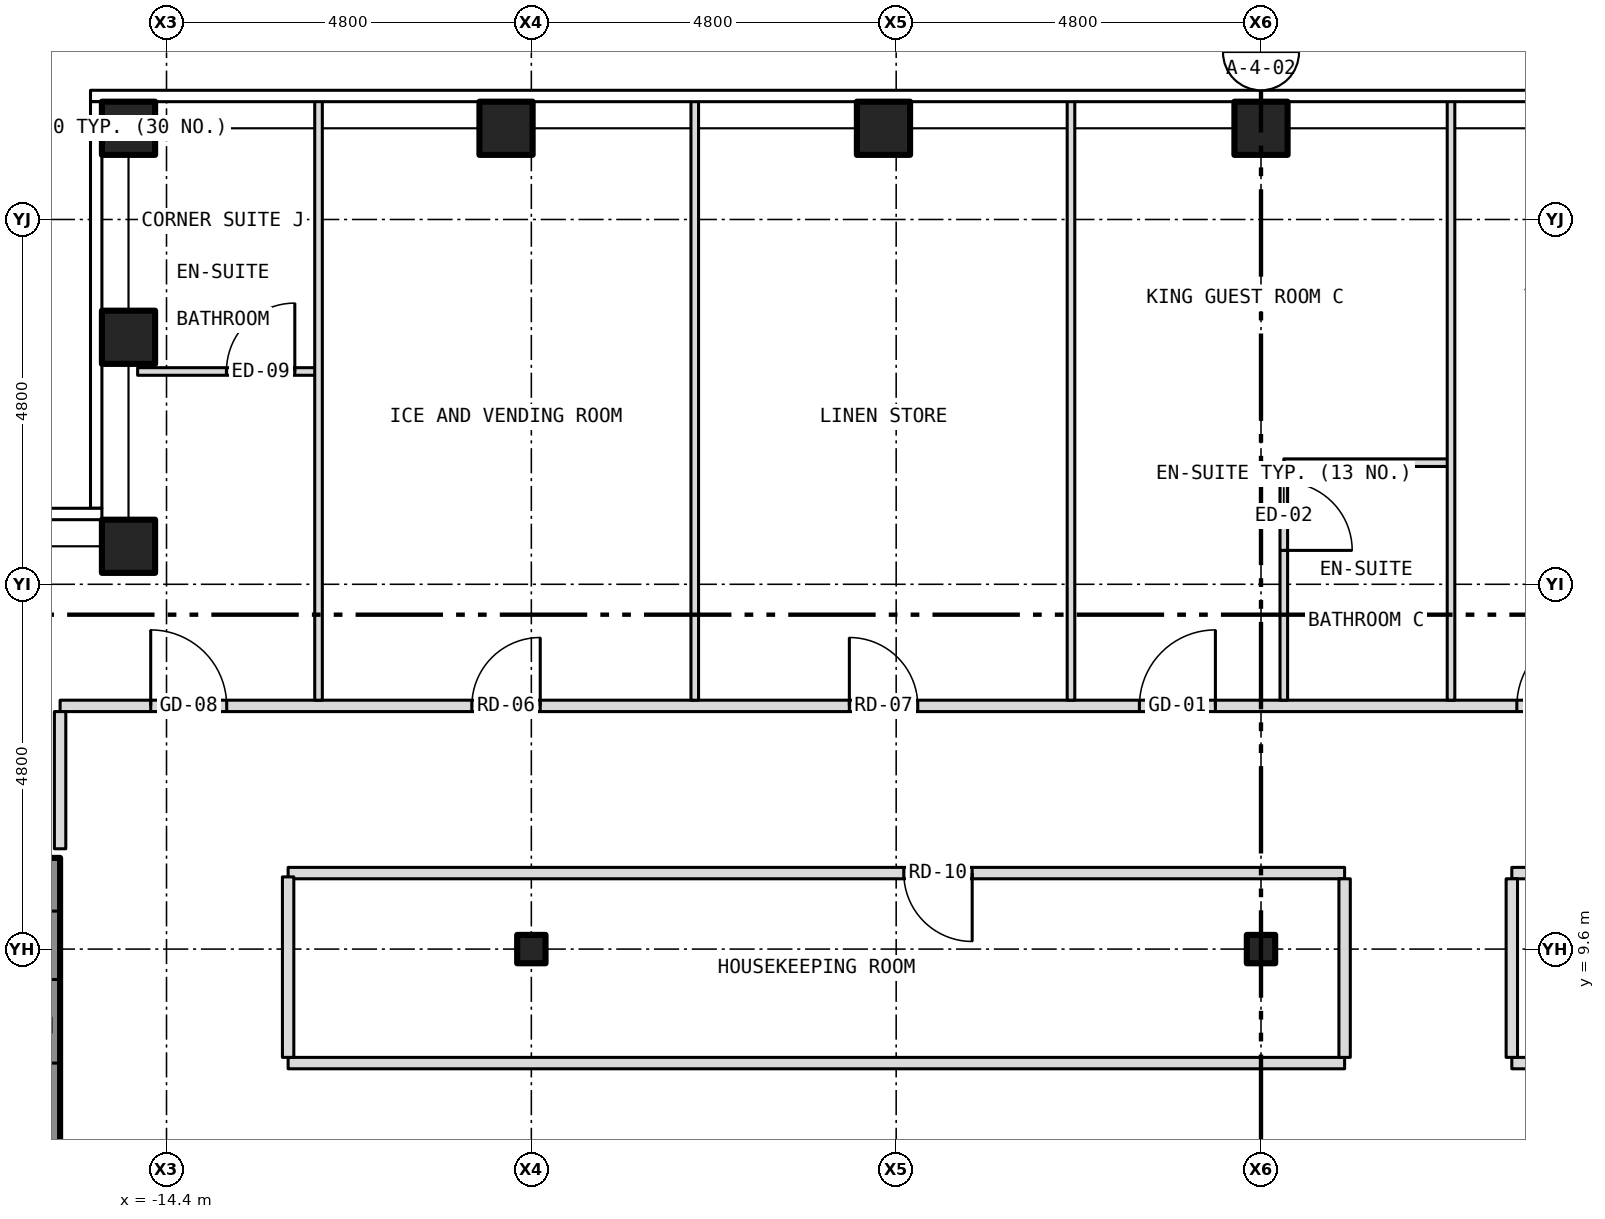
"""IFC4 building model, lengths in metres.
Left out: names, types, materials, properties, quantities, classifications, styles, units other than length and angle.
Written with IfcOpenShell. Run it as: python <this file> out.ifc"""

import sys

from ifc_helpers import new_model, si_unit, direction, frame, frame_2d, origin, origin_2d, place, context, subcontext, project, spatial, rectangle, hollow_rectangle, i_section, extrude, element, fill, save


model = new_model("IFC4")
c1 = context("Model", 3, precision=1e-05, world=origin(), true_north=direction((0.0, 1.0)))
c2 = subcontext(c1, "Body", "Model", "MODEL_VIEW")
j1 = project(units=[si_unit("LENGTHUNIT", "METRE"), si_unit("PLANEANGLEUNIT", "RADIAN")], contexts=[c1])
p1 = place(None, origin())
s1 = spatial("IfcSite", under=j1, at=p1, CompositionType="ELEMENT")
p2 = place(p1, origin())
s2 = spatial("IfcBuilding", under=s1, at=p2, CompositionType="ELEMENT")
p3 = place(p2, frame((0.0, 0.0, 215.5)))
s3 = spatial("IfcBuildingStorey", under=s2, at=p3, CompositionType="ELEMENT", Elevation=215.5)
for number, where, z_axis, x_axis in (
    (1, (-14.9, 20.4, -0.15), (0.0, 0.0, 1.0), (1.0, 0.0, 0.0)),
    (2, (-9.933, 20.4, -0.15), (0.0, 0.0, 1.0), (1.0, 0.0, 0.0)),
    (3, (-4.967, 20.4, -0.15), (0.0, 0.0, 1.0), (1.0, 0.0, 0.0)),
    (4, (0.0, 20.4, -0.15), (0.0, 0.0, 1.0), (1.0, 0.0, 0.0)),
    (5, (-14.9, 14.9, -0.15), (0.0, 0.0, 1.0), (1.0, 0.0, 0.0)),
    (6, (-14.9, 17.65, -0.15), (0.0, 0.0, 1.0), (1.0, 0.0, 0.0)),
):
    element("IfcColumn", number, at=place(p3, frame(where, z_axis=z_axis, x_axis=x_axis)), inside=s3, PredefinedType="COLUMN", context=c2, shape_type="SweptSolid", body=[
        extrude(hollow_rectangle(XDim=0.7, YDim=0.7, WallThickness=0.04, at=origin_2d()), origin(), (0.0, 0.0, 1.0), 3.5),
    ])
for number, where, z_axis, x_axis in (
    (7, (-9.6, 9.6, -0.15), (0.0, 0.0, 1.0), (1.0, 0.0, 0.0)),
    (8, (0.0, 9.6, -0.15), (0.0, 0.0, 1.0), (1.0, 0.0, 0.0)),
):
    element("IfcColumn", number, at=place(p3, frame(where, z_axis=z_axis, x_axis=x_axis)), inside=s3, PredefinedType="COLUMN", context=c2, shape_type="SweptSolid", body=[
        extrude(i_section(OverallWidth=0.373, OverallDepth=0.373, WebThickness=0.016, FlangeThickness=0.026, at=origin_2d()), origin(), (0.0, 0.0, 1.0), 3.5),
    ])
p4 = place(p3, frame((-16.0, -10.8, 0.0), z_axis=(0.0, 0.0, 1.0), x_axis=(0.0, 1.0, 0.0)))
e9 = element("IfcWall", 9, at=p4, inside=s3, PredefinedType="SHEAR", context=c2, shape_type="SweptSolid", body=[
    extrude(rectangle(XDim=21.6, YDim=0.4, at=frame_2d((10.8, 0.0))), origin(), (0.0, 0.0, 1.0), 3.25),
])
p5 = place(p4, frame((9.4, 0.0, 0.0)))
e10 = element("IfcOpeningElement", 10, at=p5, cuts=e9, PredefinedType="OPENING", context=c2, shape_type="SweptSolid", body=[
    extrude(rectangle(XDim=1.1, YDim=2.1, at=frame_2d((0.55, 1.05))), frame((0.0, 0.212, 0.0), z_axis=(0.0, -1.0, 0.0), x_axis=(1.0, 0.0, 0.0)), (0.0, 0.0, 1.0), 0.424),
])
p6 = place(p4, frame((11.5, 0.0, 0.0)))
e11 = element("IfcOpeningElement", 11, at=p6, cuts=e9, PredefinedType="OPENING", context=c2, shape_type="SweptSolid", body=[
    extrude(rectangle(XDim=1.1, YDim=2.1, at=frame_2d((0.55, 1.05))), frame((0.0, 0.212, 0.0), z_axis=(0.0, -1.0, 0.0), x_axis=(1.0, 0.0, 0.0)), (0.0, 0.0, 1.0), 0.424),
])
p7 = place(p4, frame((13.6, 0.0, 0.0)))
e12 = element("IfcOpeningElement", 12, at=p7, cuts=e9, PredefinedType="OPENING", context=c2, shape_type="SweptSolid", body=[
    extrude(rectangle(XDim=1.1, YDim=2.1, at=frame_2d((0.55, 1.05))), frame((0.0, 0.212, 0.0), z_axis=(0.0, -1.0, 0.0), x_axis=(1.0, 0.0, 0.0)), (0.0, 0.0, 1.0), 0.424),
])
p8 = place(p4, frame((15.7, 0.0, 0.0)))
e13 = element("IfcOpeningElement", 13, at=p8, cuts=e9, PredefinedType="OPENING", context=c2, shape_type="SweptSolid", body=[
    extrude(rectangle(XDim=1.1, YDim=2.1, at=frame_2d((0.55, 1.05))), frame((0.0, 0.212, 0.0), z_axis=(0.0, -1.0, 0.0), x_axis=(1.0, 0.0, 0.0)), (0.0, 0.0, 1.0), 0.424),
])
p9 = place(p4, frame((17.8, 0.0, 0.0)))
e14 = element("IfcOpeningElement", 14, at=p9, cuts=e9, PredefinedType="OPENING", context=c2, shape_type="SweptSolid", body=[
    extrude(rectangle(XDim=1.1, YDim=2.1, at=frame_2d((0.55, 1.05))), frame((0.0, 0.212, 0.0), z_axis=(0.0, -1.0, 0.0), x_axis=(1.0, 0.0, 0.0)), (0.0, 0.0, 1.0), 0.424),
])
p10 = place(p4, frame((0.458, 0.0, 0.0)))
e15 = element("IfcOpeningElement", 15, at=p10, cuts=e9, PredefinedType="OPENING", context=c2, shape_type="SweptSolid", body=[
    extrude(rectangle(XDim=1.1, YDim=2.1, at=frame_2d((0.55, 1.05))), frame((0.0, 0.212, 0.0), z_axis=(0.0, -1.0, 0.0), x_axis=(1.0, 0.0, 0.0)), (0.0, 0.0, 1.0), 0.424),
])
p11 = place(p4, frame((7.5, 0.0, 0.0)))
e16 = element("IfcOpeningElement", 16, at=p11, cuts=e9, PredefinedType="OPENING", context=c2, shape_type="SweptSolid", body=[
    extrude(rectangle(XDim=1.1, YDim=2.1, at=frame_2d((0.55, 1.05))), frame((0.0, 0.212, 0.0), z_axis=(0.0, -1.0, 0.0), x_axis=(1.0, 0.0, 0.0)), (0.0, 0.0, 1.0), 0.424),
])
p12 = place(p4, frame((20.0, 0.0, 0.0)))
e17 = element("IfcOpeningElement", 17, at=p12, cuts=e9, PredefinedType="OPENING", context=c2, shape_type="SweptSolid", body=[
    extrude(rectangle(XDim=0.9, YDim=2.1, at=frame_2d((0.45, 1.05))), frame((0.0, 0.212, 0.0), z_axis=(0.0, -1.0, 0.0), x_axis=(1.0, 0.0, 0.0)), (0.0, 0.0, 1.0), 0.424),
])
p13 = place(p3, frame((-12.8, 8.1, 0.0), z_axis=(0.0, 0.0, 1.0), x_axis=(1.0, 0.0, 0.0)))
e18 = element("IfcWall", 18, at=p13, inside=s3, PredefinedType="PARTITIONING", context=c2, shape_type="SweptSolid", body=[
    extrude(rectangle(XDim=13.9, YDim=0.15, at=frame_2d((6.95, 0.0))), origin(), (0.0, 0.0, 1.0), 3.35),
])
p14 = place(p3, frame((3.3, 8.1, 0.0), z_axis=(0.0, 0.0, 1.0), x_axis=(1.0, 0.0, 0.0)))
e19 = element("IfcWall", 19, at=p14, inside=s3, PredefinedType="PARTITIONING", context=c2, shape_type="SweptSolid", body=[
    extrude(rectangle(XDim=9.5, YDim=0.15, at=frame_2d((4.75, 0.0))), origin(), (0.0, 0.0, 1.0), 3.35),
])
p15 = place(p14, frame((6.675, 0.0, 0.0)))
e20 = element("IfcOpeningElement", 20, at=p15, cuts=e19, PredefinedType="OPENING", context=c2, shape_type="SweptSolid", body=[
    extrude(rectangle(XDim=0.9, YDim=2.1, at=frame_2d((0.45, 1.05))), frame((0.0, 0.087, 0.0), z_axis=(0.0, -1.0, 0.0), x_axis=(1.0, 0.0, 0.0)), (0.0, 0.0, 1.0), 0.174),
])
p16 = place(p3, frame((-12.8, 10.6, 0.0), z_axis=(0.0, 0.0, 1.0), x_axis=(1.0, 0.0, 0.0)))
e21 = element("IfcWall", 21, at=p16, inside=s3, PredefinedType="PARTITIONING", context=c2, shape_type="SweptSolid", body=[
    extrude(rectangle(XDim=13.9, YDim=0.15, at=frame_2d((6.95, 0.0))), origin(), (0.0, 0.0, 1.0), 3.35),
])
p17 = place(p16, frame((8.1, 0.0, 0.0)))
e22 = element("IfcOpeningElement", 22, at=p17, cuts=e21, PredefinedType="OPENING", context=c2, shape_type="SweptSolid", body=[
    extrude(rectangle(XDim=0.9, YDim=2.1, at=frame_2d((0.45, 1.05))), frame((0.0, 0.087, 0.0), z_axis=(0.0, -1.0, 0.0), x_axis=(1.0, 0.0, 0.0)), (0.0, 0.0, 1.0), 0.174),
])
p18 = place(p3, frame((3.3, 10.6, 0.0), z_axis=(0.0, 0.0, 1.0), x_axis=(1.0, 0.0, 0.0)))
e23 = element("IfcWall", 23, at=p18, inside=s3, PredefinedType="PARTITIONING", context=c2, shape_type="SweptSolid", body=[
    extrude(rectangle(XDim=9.5, YDim=0.15, at=frame_2d((4.75, 0.0))), origin(), (0.0, 0.0, 1.0), 3.35),
])
p19 = place(p18, frame((1.925, 0.0, 0.0)))
e24 = element("IfcOpeningElement", 24, at=p19, cuts=e23, PredefinedType="OPENING", context=c2, shape_type="SweptSolid", body=[
    extrude(rectangle(XDim=0.9, YDim=2.1, at=frame_2d((0.45, 1.05))), frame((0.0, 0.087, 0.0), z_axis=(0.0, -1.0, 0.0), x_axis=(1.0, 0.0, 0.0)), (0.0, 0.0, 1.0), 0.174),
])
p20 = place(p3, frame((-15.8, 12.8, 0.0), z_axis=(0.0, 0.0, 1.0), x_axis=(1.0, 0.0, 0.0)))
e25 = element("IfcWall", 25, at=p20, inside=s3, PredefinedType="PARTITIONING", context=c2, shape_type="SweptSolid", body=[
    extrude(rectangle(XDim=31.6, YDim=0.15, at=frame_2d((15.8, 0.0))), origin(), (0.0, 0.0, 1.0), 3.35),
])
p21 = place(p20, frame((5.417, 0.0, 0.0)))
e26 = element("IfcOpeningElement", 26, at=p21, cuts=e25, PredefinedType="OPENING", context=c2, shape_type="SweptSolid", body=[
    extrude(rectangle(XDim=0.9, YDim=2.1, at=frame_2d((0.45, 1.05))), frame((0.0, 0.087, 0.0), z_axis=(0.0, -1.0, 0.0), x_axis=(1.0, 0.0, 0.0)), (0.0, 0.0, 1.0), 0.174),
])
p22 = place(p20, frame((10.384, 0.0, 0.0)))
e27 = element("IfcOpeningElement", 27, at=p22, cuts=e25, PredefinedType="OPENING", context=c2, shape_type="SweptSolid", body=[
    extrude(rectangle(XDim=0.9, YDim=2.1, at=frame_2d((0.45, 1.05))), frame((0.0, 0.087, 0.0), z_axis=(0.0, -1.0, 0.0), x_axis=(1.0, 0.0, 0.0)), (0.0, 0.0, 1.0), 0.174),
])
p23 = place(p20, frame((14.2, 0.0, 0.0)))
e28 = element("IfcOpeningElement", 28, at=p23, cuts=e25, PredefinedType="OPENING", context=c2, shape_type="SweptSolid", body=[
    extrude(rectangle(XDim=1.0, YDim=2.1, at=frame_2d((0.5, 1.05))), frame((0.0, 0.087, 0.0), z_axis=(0.0, -1.0, 0.0), x_axis=(1.0, 0.0, 0.0)), (0.0, 0.0, 1.0), 0.174),
])
p24 = place(p20, frame((19.166, 0.0, 0.0)))
e29 = element("IfcOpeningElement", 29, at=p24, cuts=e25, PredefinedType="OPENING", context=c2, shape_type="SweptSolid", body=[
    extrude(rectangle(XDim=1.0, YDim=2.1, at=frame_2d((0.5, 1.05))), frame((0.0, 0.087, 0.0), z_axis=(0.0, -1.0, 0.0), x_axis=(1.0, 0.0, 0.0)), (0.0, 0.0, 1.0), 0.174),
])
p25 = place(p20, frame((24.134, 0.0, 0.0)))
e30 = element("IfcOpeningElement", 30, at=p25, cuts=e25, PredefinedType="OPENING", context=c2, shape_type="SweptSolid", body=[
    extrude(rectangle(XDim=1.0, YDim=2.1, at=frame_2d((0.5, 1.05))), frame((0.0, 0.087, 0.0), z_axis=(0.0, -1.0, 0.0), x_axis=(1.0, 0.0, 0.0)), (0.0, 0.0, 1.0), 0.174),
])
p26 = place(p20, frame((1.192, 0.0, 0.0)))
e31 = element("IfcOpeningElement", 31, at=p26, cuts=e25, PredefinedType="OPENING", context=c2, shape_type="SweptSolid", body=[
    extrude(rectangle(XDim=1.0, YDim=2.1, at=frame_2d((0.5, 1.05))), frame((0.0, 0.087, 0.0), z_axis=(0.0, -1.0, 0.0), x_axis=(1.0, 0.0, 0.0)), (0.0, 0.0, 1.0), 0.174),
])
p27 = place(p20, frame((29.409, 0.0, 0.0)))
e32 = element("IfcOpeningElement", 32, at=p27, cuts=e25, PredefinedType="OPENING", context=c2, shape_type="SweptSolid", body=[
    extrude(rectangle(XDim=1.0, YDim=2.1, at=frame_2d((0.5, 1.05))), frame((0.0, 0.087, 0.0), z_axis=(0.0, -1.0, 0.0), x_axis=(1.0, 0.0, 0.0)), (0.0, 0.0, 1.0), 0.174),
])
p28 = place(p3, frame((0.3, 16.0, 0.0), z_axis=(0.0, 0.0, 1.0), x_axis=(1.0, 0.0, 0.0)))
e33 = element("IfcWall", 33, at=p28, inside=s3, PredefinedType="PARTITIONING", context=c2, shape_type="SweptSolid", body=[
    extrude(rectangle(XDim=2.2, YDim=0.1, at=frame_2d((1.1, 0.0))), origin(), (0.0, 0.0, 1.0), 3.35),
])
p29 = place(p3, frame((-14.78, 17.2, 0.0), z_axis=(0.0, 0.0, 1.0), x_axis=(1.0, 0.0, 0.0)))
e34 = element("IfcWall", 34, at=p29, inside=s3, PredefinedType="PARTITIONING", context=c2, shape_type="SweptSolid", body=[
    extrude(rectangle(XDim=2.38, YDim=0.1, at=frame_2d((1.19, 0.0))), origin(), (0.0, 0.0, 1.0), 3.35),
])
p30 = place(p29, frame((1.168, 0.0, 0.0)))
e35 = element("IfcOpeningElement", 35, at=p30, cuts=e34, PredefinedType="OPENING", context=c2, shape_type="SweptSolid", body=[
    extrude(rectangle(XDim=0.9, YDim=2.1, at=frame_2d((0.45, 1.05))), frame((0.0, 0.062, 0.0), z_axis=(0.0, -1.0, 0.0), x_axis=(1.0, 0.0, 0.0)), (0.0, 0.0, 1.0), 0.124),
])
p31 = place(p3, frame((-15.8, 10.92, 0.0), z_axis=(0.0, 0.0, 1.0), x_axis=(0.0, 1.0, 0.0)))
e36 = element("IfcWall", 36, at=p31, inside=s3, PredefinedType="PARTITIONING", context=c2, shape_type="SweptSolid", body=[
    extrude(rectangle(XDim=1.805, YDim=0.15, at=frame_2d((0.903, 0.0))), origin(), (0.0, 0.0, 1.0), 3.35),
])
p32 = place(p3, frame((-12.8, 8.175, 0.0), z_axis=(0.0, 0.0, 1.0), x_axis=(0.0, 1.0, 0.0)))
e37 = element("IfcWall", 37, at=p32, inside=s3, PredefinedType="PARTITIONING", context=c2, shape_type="SweptSolid", body=[
    extrude(rectangle(XDim=2.375, YDim=0.15, at=frame_2d((1.188, 0.0))), origin(), (0.0, 0.0, 1.0), 3.35),
])
for number, where, z_axis, x_axis in (
    (38, (-12.4, 12.875, 0.0), (0.0, 0.0, 1.0), (0.0, 1.0, 0.0)),
    (39, (-7.45, 12.875, 0.0), (0.0, 0.0, 1.0), (0.0, 1.0, 0.0)),
    (40, (-2.5, 12.875, 0.0), (0.0, 0.0, 1.0), (0.0, 1.0, 0.0)),
):
    element("IfcWall", number, at=place(p3, frame(where, z_axis=z_axis, x_axis=x_axis)), inside=s3, PredefinedType="PARTITIONING", context=c2, shape_type="SweptSolid", body=[
        extrude(rectangle(XDim=7.905, YDim=0.1, at=frame_2d((3.953, 0.0))), origin(), (0.0, 0.0, 1.0), 3.35),
    ])
p33 = place(p3, frame((0.3, 12.875, 0.0), z_axis=(0.0, 0.0, 1.0), x_axis=(0.0, 1.0, 0.0)))
e41 = element("IfcWall", 41, at=p33, inside=s3, PredefinedType="PARTITIONING", context=c2, shape_type="SweptSolid", body=[
    extrude(rectangle(XDim=3.075, YDim=0.1, at=frame_2d((1.538, 0.0))), origin(), (0.0, 0.0, 1.0), 3.35),
])
p34 = place(p33, frame((1.971, 0.0, 0.0)))
e42 = element("IfcOpeningElement", 42, at=p34, cuts=e41, PredefinedType="OPENING", context=c2, shape_type="SweptSolid", body=[
    extrude(rectangle(XDim=0.9, YDim=2.1, at=frame_2d((0.45, 1.05))), frame((0.0, 0.062, 0.0), z_axis=(0.0, -1.0, 0.0), x_axis=(1.0, 0.0, 0.0)), (0.0, 0.0, 1.0), 0.124),
])
p35 = place(p3, frame((1.1, 8.175, 0.0), z_axis=(0.0, 0.0, 1.0), x_axis=(0.0, 1.0, 0.0)))
e43 = element("IfcWall", 43, at=p35, inside=s3, PredefinedType="PARTITIONING", context=c2, shape_type="SweptSolid", body=[
    extrude(rectangle(XDim=2.35, YDim=0.15, at=frame_2d((1.175, 0.0))), origin(), (0.0, 0.0, 1.0), 3.35),
])
p36 = place(p3, frame((2.5, 12.875, 0.0), z_axis=(0.0, 0.0, 1.0), x_axis=(0.0, 1.0, 0.0)))
e44 = element("IfcWall", 44, at=p36, inside=s3, PredefinedType="PARTITIONING", context=c2, shape_type="SweptSolid", body=[
    extrude(rectangle(XDim=7.905, YDim=0.1, at=frame_2d((3.953, 0.0))), origin(), (0.0, 0.0, 1.0), 3.35),
])
p37 = place(p3, frame((3.3, 8.175, 0.0), z_axis=(0.0, 0.0, 1.0), x_axis=(0.0, 1.0, 0.0)))
e45 = element("IfcWall", 45, at=p37, inside=s3, PredefinedType="PARTITIONING", context=c2, shape_type="SweptSolid", body=[
    extrude(rectangle(XDim=2.35, YDim=0.15, at=frame_2d((1.175, 0.0))), origin(), (0.0, 0.0, 1.0), 3.35),
])
p38 = place(p21, origin())
e46 = element("IfcDoor", 46, at=p38, inside=s3, OperationType="SINGLE_SWING_RIGHT", PredefinedType="DOOR", context=c2, shape_type="SweptSolid", body=[
    extrude(rectangle(XDim=0.9, YDim=2.1, at=frame_2d((0.45, 1.05))), frame((0.0, 0.025, 0.0), z_axis=(0.0, -1.0, 0.0), x_axis=(1.0, 0.0, 0.0)), (0.0, 0.0, 1.0), 0.05),
])
fill(e26, e46)
p39 = place(p22, origin())
e47 = element("IfcDoor", 47, at=p39, inside=s3, OperationType="SINGLE_SWING_LEFT", PredefinedType="DOOR", context=c2, shape_type="SweptSolid", body=[
    extrude(rectangle(XDim=0.9, YDim=2.1, at=frame_2d((0.45, 1.05))), frame((0.0, 0.025, 0.0), z_axis=(0.0, -1.0, 0.0), x_axis=(1.0, 0.0, 0.0)), (0.0, 0.0, 1.0), 0.05),
])
fill(e27, e47)
p40 = place(p23, origin())
e48 = element("IfcDoor", 48, at=p40, inside=s3, OperationType="SINGLE_SWING_RIGHT", PredefinedType="DOOR", context=c2, shape_type="SweptSolid", body=[
    extrude(rectangle(XDim=1.0, YDim=2.1, at=frame_2d((0.5, 1.05))), frame((0.0, 0.025, 0.0), z_axis=(0.0, -1.0, 0.0), x_axis=(1.0, 0.0, 0.0)), (0.0, 0.0, 1.0), 0.05),
])
fill(e28, e48)
p41 = place(p34, origin())
e49 = element("IfcDoor", 49, at=p41, inside=s3, OperationType="SINGLE_SWING_LEFT", PredefinedType="DOOR", context=c2, shape_type="SweptSolid", body=[
    extrude(rectangle(XDim=0.9, YDim=2.1, at=frame_2d((0.45, 1.05))), frame((0.0, 0.025, 0.0), z_axis=(0.0, -1.0, 0.0), x_axis=(1.0, 0.0, 0.0)), (0.0, 0.0, 1.0), 0.05),
])
fill(e42, e49)
p42 = place(p24, origin())
e50 = element("IfcDoor", 50, at=p42, inside=s3, OperationType="SINGLE_SWING_RIGHT", PredefinedType="DOOR", context=c2, shape_type="SweptSolid", body=[
    extrude(rectangle(XDim=1.0, YDim=2.1, at=frame_2d((0.5, 1.05))), frame((0.0, 0.025, 0.0), z_axis=(0.0, -1.0, 0.0), x_axis=(1.0, 0.0, 0.0)), (0.0, 0.0, 1.0), 0.05),
])
fill(e29, e50)
p43 = place(p30, origin())
e51 = element("IfcDoor", 51, at=p43, inside=s3, OperationType="SINGLE_SWING_RIGHT", PredefinedType="DOOR", context=c2, shape_type="SweptSolid", body=[
    extrude(rectangle(XDim=0.9, YDim=2.1, at=frame_2d((0.45, 1.05))), frame((0.0, 0.025, 0.0), z_axis=(0.0, -1.0, 0.0), x_axis=(1.0, 0.0, 0.0)), (0.0, 0.0, 1.0), 0.05),
])
fill(e35, e51)
p44 = place(p26, origin())
e52 = element("IfcDoor", 52, at=p44, inside=s3, OperationType="SINGLE_SWING_LEFT", PredefinedType="DOOR", context=c2, shape_type="SweptSolid", body=[
    extrude(rectangle(XDim=1.0, YDim=2.1, at=frame_2d((0.5, 1.05))), frame((0.0, 0.025, 0.0), z_axis=(0.0, -1.0, 0.0), x_axis=(1.0, 0.0, 0.0)), (0.0, 0.0, 1.0), 0.05),
])
fill(e31, e52)
p45 = place(p17, origin())
e53 = element("IfcDoor", 53, at=p45, inside=s3, OperationType="SINGLE_SWING_RIGHT", PredefinedType="DOOR", context=c2, shape_type="SweptSolid", body=[
    extrude(rectangle(XDim=0.9, YDim=2.1, at=frame_2d((0.45, 1.05))), frame((0.0, 0.025, 0.0), z_axis=(0.0, -1.0, 0.0), x_axis=(1.0, 0.0, 0.0)), (0.0, 0.0, 1.0), 0.05),
])
fill(e22, e53)
save(model, sys.argv[1])
